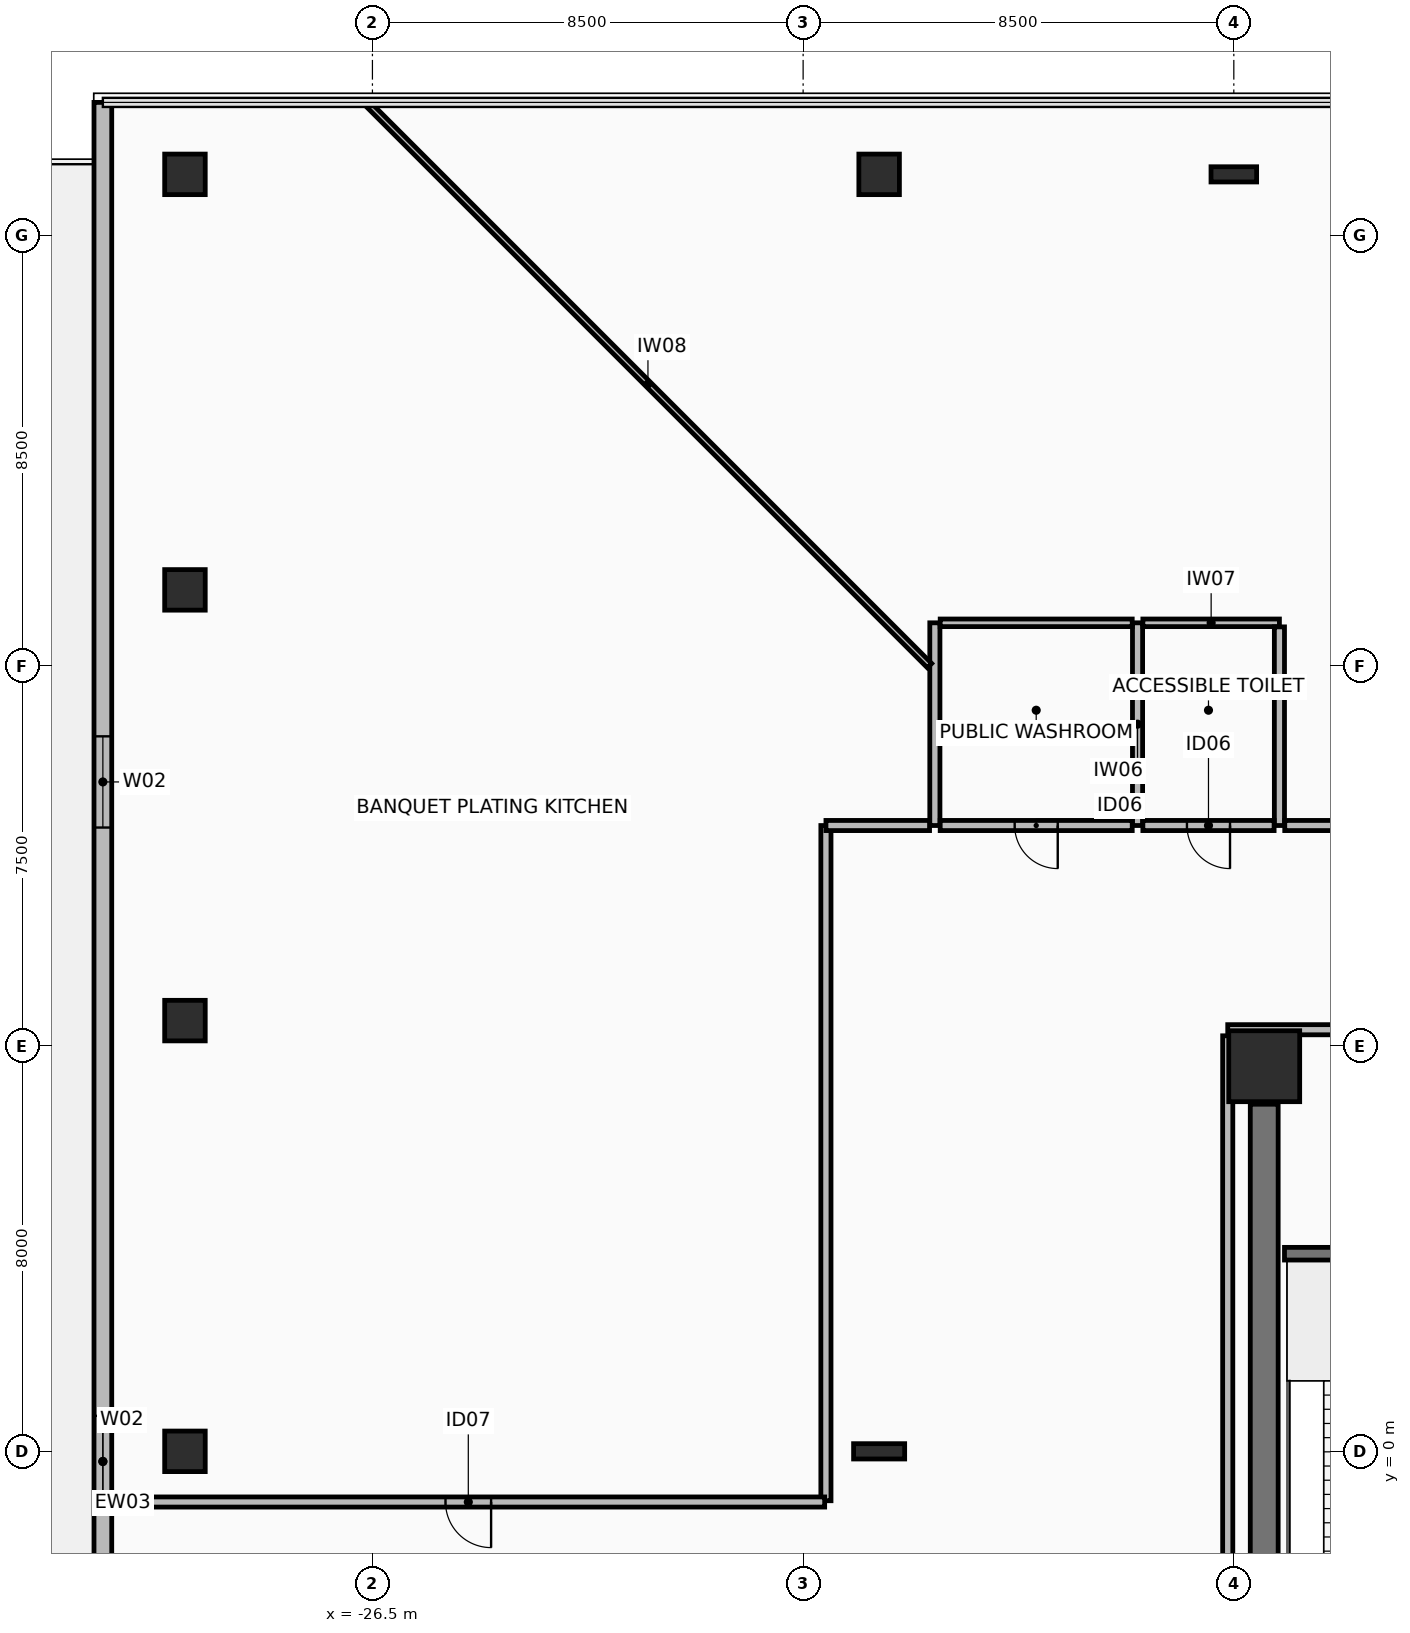
"""IFC4 building model, lengths in metres.
Left out: names, types, materials, properties, quantities, classifications, styles, units other than length and angle.
Written with IfcOpenShell. Run it as: python <this file> out.ifc"""

import sys

from ifc_helpers import new_model, si_unit, direction, frame, frame_2d, origin, origin_2d, place, context, subcontext, project, spatial, rectangle, hollow_rectangle, i_section, extrude, element, fill, save


model = new_model("IFC4")
c1 = context("Model", 3, precision=1e-05, world=origin(), true_north=direction((0.0, 1.0)))
c2 = subcontext(c1, "Body", "Model", "MODEL_VIEW")
j1 = project(units=[si_unit("LENGTHUNIT", "METRE"), si_unit("PLANEANGLEUNIT", "RADIAN")], contexts=[c1])
p1 = place(None, origin())
s1 = spatial("IfcSite", under=j1, at=p1, CompositionType="ELEMENT")
p2 = place(p1, origin())
s2 = spatial("IfcBuilding", under=s1, at=p2, CompositionType="ELEMENT")
p3 = place(p2, frame((0.0, 0.0, 16.5)))
s3 = spatial("IfcBuildingStorey", under=s2, at=p3, CompositionType="ELEMENT", Elevation=16.5)
p4 = place(p3, frame((-8.9, 7.6, 0.0), z_axis=(0.0, 0.0, 1.0), x_axis=(1.0, 0.0, 0.0)))
e1 = element("IfcColumn", 1, at=p4, inside=s3, PredefinedType="COLUMN", context=c2, shape_type="SweptSolid", body=[
    extrude(rectangle(XDim=1.4, YDim=1.4, at=origin_2d()), origin(), (0.0, 0.0, 1.0), 5.0),
])
for number, where, z_axis, x_axis in (
    (2, (-30.2, 25.2, 0.0), (0.0, 0.0, 1.0), (1.0, 0.0, 0.0)),
    (3, (-16.5, 25.2, 0.0), (0.0, 0.0, 1.0), (1.0, 0.0, 0.0)),
):
    element("IfcColumn", number, at=place(p3, frame(where, z_axis=z_axis, x_axis=x_axis)), inside=s3, PredefinedType="COLUMN", context=c2, shape_type="SweptSolid", body=[
        extrude(hollow_rectangle(XDim=0.8, YDim=0.8, WallThickness=0.045, at=origin_2d()), origin(), (0.0, 0.0, 1.0), 5.0),
    ])
p5 = place(p3, frame((-9.5, 25.2, 0.0), z_axis=(0.0, 0.0, 1.0), x_axis=(1.0, 0.0, 0.0)))
e4 = element("IfcColumn", 4, at=p5, inside=s3, PredefinedType="COLUMN", context=c2, shape_type="SweptSolid", body=[
    extrude(i_section(OverallWidth=0.3, OverallDepth=0.9, WebThickness=0.019, FlangeThickness=0.035, at=origin_2d()), origin(), (0.0, 0.0, 1.0), 5.0),
])
for number, where, z_axis, x_axis in (
    (5, (-30.2, 0.0, 0.0), (0.0, 0.0, 1.0), (1.0, 0.0, 0.0)),
    (6, (-30.2, 8.5, 0.0), (0.0, 0.0, 1.0), (1.0, 0.0, 0.0)),
    (7, (-30.2, 17.0, 0.0), (0.0, 0.0, 1.0), (1.0, 0.0, 0.0)),
):
    element("IfcColumn", number, at=place(p3, frame(where, z_axis=z_axis, x_axis=x_axis)), inside=s3, PredefinedType="COLUMN", context=c2, shape_type="SweptSolid", body=[
        extrude(hollow_rectangle(XDim=0.8, YDim=0.8, WallThickness=0.045, at=origin_2d()), origin(), (0.0, 0.0, 1.0), 5.0),
    ])
p6 = place(p3, frame((-16.5, 0.0, 0.0), z_axis=(0.0, 0.0, 1.0), x_axis=(1.0, 0.0, 0.0)))
e8 = element("IfcColumn", 8, at=p6, inside=s3, PredefinedType="COLUMN", context=c2, shape_type="SweptSolid", body=[
    extrude(i_section(OverallWidth=0.302, OverallDepth=1.008, WebThickness=0.021, FlangeThickness=0.04, at=origin_2d()), origin(), (0.0, 0.0, 1.0), 5.0),
])
p7 = place(p3, frame((-31.82, 26.62, 0.0), z_axis=(0.0, 0.0, 1.0), x_axis=(0.0, -1.0, 0.0)))
e9 = element("IfcWall", 9, at=p7, inside=s3, PredefinedType="STANDARD", context=c2, shape_type="SweptSolid", body=[
    extrude(rectangle(XDim=53.64, YDim=0.35, at=frame_2d((26.82, 0.0))), origin(), (0.0, 0.0, 1.0), 4.74),
])
p8 = place(p7, frame((29.8, 0.0, 0.0)))
e10 = element("IfcOpeningElement", 10, at=p8, cuts=e9, PredefinedType="OPENING", context=c2, shape_type="SweptSolid", body=[
    extrude(rectangle(XDim=1.8, YDim=2.3, at=frame_2d((0.9, 1.15))), frame((0.0, 0.185, 0.0), z_axis=(0.0, -1.0, 0.0), x_axis=(1.0, 0.0, 0.0)), (0.0, 0.0, 1.0), 0.37),
])
p9 = place(p7, frame((12.51, 0.0, 0.95)))
e11 = element("IfcOpeningElement", 11, at=p9, cuts=e9, PredefinedType="OPENING", context=c2, shape_type="SweptSolid", body=[
    extrude(rectangle(XDim=1.8, YDim=2.2, at=frame_2d((0.9, 1.1))), frame((0.0, 0.185, 0.0), z_axis=(0.0, -1.0, 0.0), x_axis=(1.0, 0.0, 0.0)), (0.0, 0.0, 1.0), 0.37),
])
p10 = place(p7, frame((25.92, 0.0, 0.95)))
e12 = element("IfcOpeningElement", 12, at=p10, cuts=e9, PredefinedType="OPENING", context=c2, shape_type="SweptSolid", body=[
    extrude(rectangle(XDim=1.8, YDim=2.2, at=frame_2d((0.9, 1.1))), frame((0.0, 0.185, 0.0), z_axis=(0.0, -1.0, 0.0), x_axis=(1.0, 0.0, 0.0)), (0.0, 0.0, 1.0), 0.37),
])
p11 = place(p7, frame((39.33, 0.0, 0.95)))
e13 = element("IfcOpeningElement", 13, at=p11, cuts=e9, PredefinedType="OPENING", context=c2, shape_type="SweptSolid", body=[
    extrude(rectangle(XDim=1.8, YDim=2.2, at=frame_2d((0.9, 1.1))), frame((0.0, 0.185, 0.0), z_axis=(0.0, -1.0, 0.0), x_axis=(1.0, 0.0, 0.0)), (0.0, 0.0, 1.0), 0.37),
])
p12 = place(p3, frame((-8.9, -3.85, 0.0), z_axis=(0.0, 0.0, 1.0), x_axis=(0.0, 1.0, 0.0)))
e14 = element("IfcWall", 14, at=p12, inside=s3, PredefinedType="SHEAR", context=c2, shape_type="SweptSolid", body=[
    extrude(rectangle(XDim=10.7, YDim=0.55, at=frame_2d((5.35, 0.0))), origin(), (0.0, 0.0, 1.0), 4.74),
])
p13 = place(p3, frame((9.62, 8.32, 0.0), z_axis=(0.0, 0.0, 1.0), x_axis=(-1.0, 0.0, 0.0)))
e15 = element("IfcWall", 15, at=p13, inside=s3, PredefinedType="PARTITIONING", context=c2, shape_type="SweptSolid", body=[
    extrude(rectangle(XDim=19.24, YDim=0.2, at=frame_2d((9.62, 0.0))), origin(), (0.0, 0.0, 1.0), 3.135),
])
p14 = place(p13, frame((14.22, 0.0, 0.0)))
e16 = element("IfcOpeningElement", 16, at=p14, cuts=e15, PredefinedType="OPENING", context=c2, shape_type="SweptSolid", body=[
    extrude(rectangle(XDim=0.9, YDim=2.1, at=frame_2d((0.45, 1.05))), frame((0.0, 0.11, 0.0), z_axis=(0.0, -1.0, 0.0), x_axis=(1.0, 0.0, 0.0)), (0.0, 0.0, 1.0), 0.22),
])
p15 = place(p3, frame((-9.62, 8.2, 0.0), z_axis=(0.0, 0.0, 1.0), x_axis=(0.0, -1.0, 0.0)))
e17 = element("IfcWall", 17, at=p15, inside=s3, PredefinedType="PARTITIONING", context=c2, shape_type="SweptSolid", body=[
    extrude(rectangle(XDim=16.4, YDim=0.2, at=frame_2d((8.2, 0.0))), origin(), (0.0, 0.0, 1.0), 3.135),
])
p16 = place(p15, frame((12.65, 0.0, 0.0)))
e18 = element("IfcOpeningElement", 18, at=p16, cuts=e17, PredefinedType="OPENING", context=c2, shape_type="SweptSolid", body=[
    extrude(rectangle(XDim=1.1, YDim=2.15, at=frame_2d((0.55, 1.075))), frame((0.0, 0.11, 0.0), z_axis=(0.0, -1.0, 0.0), x_axis=(1.0, 0.0, 0.0)), (0.0, 0.0, 1.0), 0.22),
])
p17 = place(p3, frame((-8.5, 3.9, 0.0), z_axis=(0.0, 0.0, 1.0), x_axis=(1.0, 0.0, 0.0)))
e19 = element("IfcWall", 19, at=p17, inside=s3, PredefinedType="SHEAR", context=c2, shape_type="SweptSolid", body=[
    extrude(rectangle(XDim=2.95, YDim=0.25, at=frame_2d((1.475, 0.0))), origin(), (0.0, 0.0, 1.0), 4.74),
])
p18 = place(p3, frame((-11.4, 12.35, 0.0), z_axis=(0.0, 0.0, 1.0), x_axis=(0.0, 1.0, 0.0)))
e20 = element("IfcWall", 20, at=p18, inside=s3, PredefinedType="PARTITIONING", context=c2, shape_type="SweptSolid", body=[
    extrude(rectangle(XDim=4.0, YDim=0.2, at=frame_2d((2.0, 0.0))), origin(), (0.0, 0.0, 1.0), 4.285),
])
p19 = place(p3, frame((-11.295, 16.35, 0.0), z_axis=(0.0, 0.0, 1.0), x_axis=(1.0, 0.0, 0.0)))
e21 = element("IfcWall", 21, at=p19, inside=s3, PredefinedType="PARTITIONING", context=c2, shape_type="SweptSolid", body=[
    extrude(rectangle(XDim=2.695, YDim=0.15, at=frame_2d((1.347, 0.0))), origin(), (0.0, 0.0, 1.0), 3.135),
])
p20 = place(p3, frame((-8.6, 16.27, 0.0), z_axis=(0.0, 0.0, 1.0), x_axis=(0.0, -1.0, 0.0)))
e22 = element("IfcWall", 22, at=p20, inside=s3, PredefinedType="PARTITIONING", context=c2, shape_type="SweptSolid", body=[
    extrude(rectangle(XDim=3.92, YDim=0.2, at=frame_2d((1.96, 0.0))), origin(), (0.0, 0.0, 1.0), 3.135),
])
p21 = place(p3, frame((-8.705, 12.35, 0.0), z_axis=(0.0, 0.0, 1.0), x_axis=(-1.0, 0.0, 0.0)))
e23 = element("IfcWall", 23, at=p21, inside=s3, PredefinedType="PARTITIONING", context=c2, shape_type="SweptSolid", body=[
    extrude(rectangle(XDim=2.59, YDim=0.2, at=frame_2d((1.295, 0.0))), origin(), (0.0, 0.0, 1.0), 3.135),
])
p22 = place(p21, frame((0.87, 0.0, 0.0)))
e24 = element("IfcOpeningElement", 24, at=p22, cuts=e23, PredefinedType="OPENING", context=c2, shape_type="SweptSolid", body=[
    extrude(rectangle(XDim=0.85, YDim=2.1, at=frame_2d((0.425, 1.05))), frame((0.0, 0.11, 0.0), z_axis=(0.0, -1.0, 0.0), x_axis=(1.0, 0.0, 0.0)), (0.0, 0.0, 1.0), 0.22),
])
p23 = place(p3, frame((-15.4, 12.35, 0.0), z_axis=(0.0, 0.0, 1.0), x_axis=(0.0, 1.0, 0.0)))
e25 = element("IfcWall", 25, at=p23, inside=s3, PredefinedType="PARTITIONING", context=c2, shape_type="SweptSolid", body=[
    extrude(rectangle(XDim=4.0, YDim=0.2, at=frame_2d((2.0, 0.0))), origin(), (0.0, 0.0, 1.0), 4.285),
])
p24 = place(p3, frame((-15.295, 16.35, 0.0), z_axis=(0.0, 0.0, 1.0), x_axis=(1.0, 0.0, 0.0)))
e26 = element("IfcWall", 26, at=p24, inside=s3, PredefinedType="PARTITIONING", context=c2, shape_type="SweptSolid", body=[
    extrude(rectangle(XDim=3.79, YDim=0.15, at=frame_2d((1.895, 0.0))), origin(), (0.0, 0.0, 1.0), 4.74),
])
p25 = place(p3, frame((-11.505, 12.35, 0.0), z_axis=(0.0, 0.0, 1.0), x_axis=(-1.0, 0.0, 0.0)))
e27 = element("IfcWall", 27, at=p25, inside=s3, PredefinedType="PARTITIONING", context=c2, shape_type="SweptSolid", body=[
    extrude(rectangle(XDim=3.79, YDim=0.2, at=frame_2d((1.895, 0.0))), origin(), (0.0, 0.0, 1.0), 4.74),
])
p26 = place(p25, frame((1.47, 0.0, 0.0)))
e28 = element("IfcOpeningElement", 28, at=p26, cuts=e27, PredefinedType="OPENING", context=c2, shape_type="SweptSolid", body=[
    extrude(rectangle(XDim=0.85, YDim=2.1, at=frame_2d((0.425, 1.05))), frame((0.0, 0.11, 0.0), z_axis=(0.0, -1.0, 0.0), x_axis=(1.0, 0.0, 0.0)), (0.0, 0.0, 1.0), 0.22),
])
p27 = place(p3, frame((-15.505, 15.505, 0.0), z_axis=(0.0, 0.0, 1.0), x_axis=(-0.707106781187, 0.707106781187, 0.0)))
e29 = element("IfcWall", 29, at=p27, inside=s3, PredefinedType="PARTITIONING", context=c2, shape_type="SweptSolid", body=[
    extrude(rectangle(XDim=15.719, YDim=0.12, at=frame_2d((7.86, 0.0))), origin(), (0.0, 0.0, 1.0), 3.135),
])
p28 = place(p3, frame((17.525, 12.35, 0.0), z_axis=(0.0, 0.0, 1.0), x_axis=(-1.0, 0.0, 0.0)))
e30 = element("IfcWall", 30, at=p28, inside=s3, PredefinedType="PARTITIONING", context=c2, shape_type="SweptSolid", body=[
    extrude(rectangle(XDim=26.02, YDim=0.2, at=frame_2d((13.01, 0.0))), origin(), (0.0, 0.0, 1.0), 3.135),
])
p29 = place(p28, frame((12.41, 0.0, 0.0)))
e31 = element("IfcOpeningElement", 31, at=p29, cuts=e30, PredefinedType="OPENING", context=c2, shape_type="SweptSolid", body=[
    extrude(rectangle(XDim=1.2, YDim=2.15, at=frame_2d((0.6, 1.075))), frame((0.0, 0.11, 0.0), z_axis=(0.0, -1.0, 0.0), x_axis=(1.0, 0.0, 0.0)), (0.0, 0.0, 1.0), 0.22),
])
p30 = place(p3, frame((-17.55, 12.349, 0.0), z_axis=(0.0, 0.0, 1.0), x_axis=(0.0, -1.0, 0.0)))
e32 = element("IfcWall", 32, at=p30, inside=s3, PredefinedType="PARTITIONING", context=c2, shape_type="SweptSolid", body=[
    extrude(rectangle(XDim=13.324, YDim=0.2, at=frame_2d((6.662, 0.0))), origin(), (0.0, 0.0, 1.0), 3.135),
])
p31 = place(p3, frame((-17.575, -1.0, 0.0), z_axis=(0.0, 0.0, 1.0), x_axis=(-1.0, 0.0, 0.0)))
e33 = element("IfcWall", 33, at=p31, inside=s3, PredefinedType="PARTITIONING", context=c2, shape_type="SweptSolid", body=[
    extrude(rectangle(XDim=14.065, YDim=0.2, at=frame_2d((7.032, 0.0))), origin(), (0.0, 0.0, 1.0), 3.935),
])
p32 = place(p31, frame((6.583, 0.0, 0.0)))
e34 = element("IfcOpeningElement", 34, at=p32, cuts=e33, PredefinedType="OPENING", context=c2, shape_type="SweptSolid", body=[
    extrude(rectangle(XDim=0.9, YDim=2.1, at=frame_2d((0.45, 1.05))), frame((0.0, 0.11, 0.0), z_axis=(0.0, -1.0, 0.0), x_axis=(1.0, 0.0, 0.0)), (0.0, 0.0, 1.0), 0.22),
])
p33 = place(p3, frame((-15.505, 12.35, 0.0), z_axis=(0.0, 0.0, 1.0), x_axis=(-1.0, 0.0, 0.0)))
e35 = element("IfcWall", 35, at=p33, inside=s3, PredefinedType="PARTITIONING", context=c2, shape_type="SweptSolid", body=[
    extrude(rectangle(XDim=2.044, YDim=0.2, at=frame_2d((1.022, 0.0))), origin(), (0.0, 0.0, 1.0), 3.135),
])
p34 = place(p9, origin())
e36 = element("IfcWindow", 36, at=p34, inside=s3, PartitioningType="SINGLE_PANEL", PredefinedType="WINDOW", context=c2, shape_type="SweptSolid", body=[
    extrude(rectangle(XDim=1.8, YDim=2.2, at=frame_2d((0.9, 1.1))), frame((0.0, 0.03, 0.0), z_axis=(0.0, -1.0, 0.0), x_axis=(1.0, 0.0, 0.0)), (0.0, 0.0, 1.0), 0.06),
])
fill(e11, e36)
p35 = place(p10, origin())
e37 = element("IfcWindow", 37, at=p35, inside=s3, PartitioningType="SINGLE_PANEL", PredefinedType="WINDOW", context=c2, shape_type="SweptSolid", body=[
    extrude(rectangle(XDim=1.8, YDim=2.2, at=frame_2d((0.9, 1.1))), frame((0.0, 0.03, 0.0), z_axis=(0.0, -1.0, 0.0), x_axis=(1.0, 0.0, 0.0)), (0.0, 0.0, 1.0), 0.06),
])
fill(e12, e37)
p36 = place(p22, origin())
e38 = element("IfcDoor", 38, at=p36, inside=s3, OperationType="SINGLE_SWING_RIGHT", PredefinedType="DOOR", context=c2, shape_type="SweptSolid", body=[
    extrude(rectangle(XDim=0.85, YDim=2.1, at=frame_2d((0.425, 1.05))), frame((0.0, 0.025, 0.0), z_axis=(0.0, -1.0, 0.0), x_axis=(1.0, 0.0, 0.0)), (0.0, 0.0, 1.0), 0.05),
])
fill(e24, e38)
p37 = place(p26, origin())
e39 = element("IfcDoor", 39, at=p37, inside=s3, OperationType="SINGLE_SWING_RIGHT", PredefinedType="DOOR", context=c2, shape_type="SweptSolid", body=[
    extrude(rectangle(XDim=0.85, YDim=2.1, at=frame_2d((0.425, 1.05))), frame((0.0, 0.025, 0.0), z_axis=(0.0, -1.0, 0.0), x_axis=(1.0, 0.0, 0.0)), (0.0, 0.0, 1.0), 0.05),
])
fill(e28, e39)
p38 = place(p32, origin())
e40 = element("IfcDoor", 40, at=p38, inside=s3, OperationType="SINGLE_SWING_LEFT", PredefinedType="DOOR", context=c2, shape_type="SweptSolid", body=[
    extrude(rectangle(XDim=0.9, YDim=2.1, at=frame_2d((0.45, 1.05))), frame((0.0, 0.025, 0.0), z_axis=(0.0, -1.0, 0.0), x_axis=(1.0, 0.0, 0.0)), (0.0, 0.0, 1.0), 0.05),
])
fill(e34, e40)
save(model, sys.argv[1])
